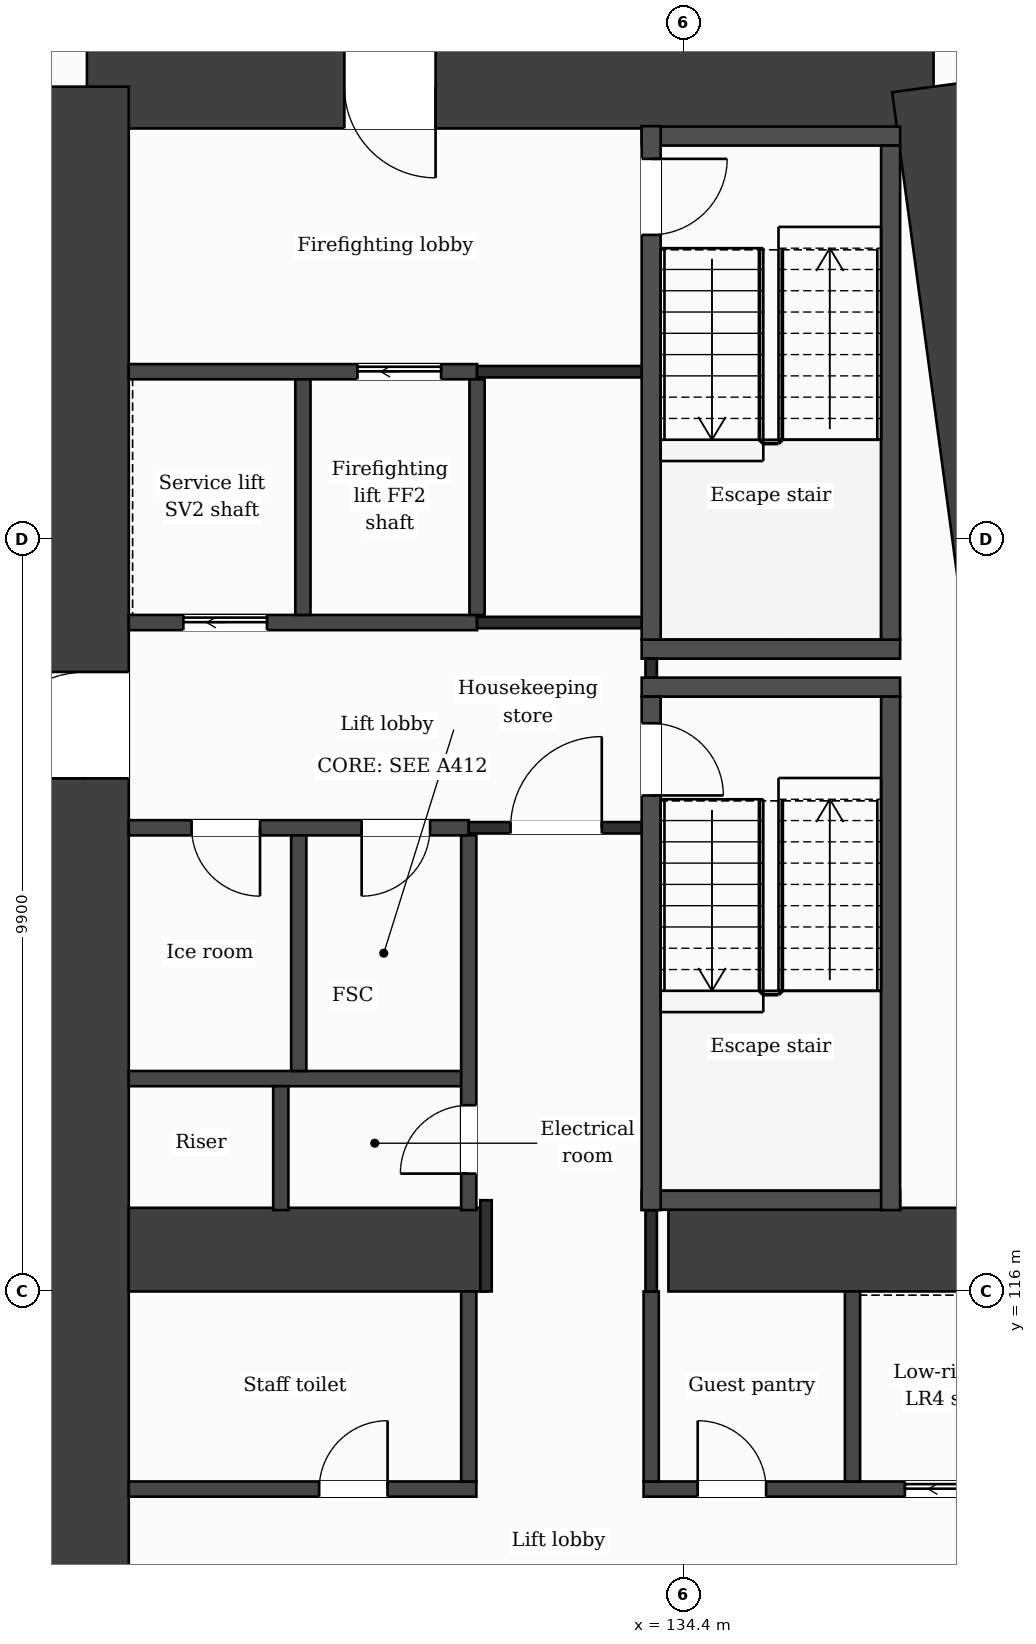
"""IFC4 building model, lengths in metres.
Left out: names, types, materials, properties, quantities, classifications, styles, units other than length and angle.
Written with IfcOpenShell. Run it as: python <this file> out.ifc"""

import sys

from ifc_helpers import new_model, si_unit, direction, frame, frame_2d, origin, place, context, subcontext, project, spatial, rectangle, extrude, element, fill, save


model = new_model("IFC4")
c1 = context("Model", 3, precision=1e-05, world=origin(), true_north=direction((0.0, 1.0)))
c2 = subcontext(c1, "Body", "Model", "MODEL_VIEW")
j1 = project(units=[si_unit("LENGTHUNIT", "METRE"), si_unit("PLANEANGLEUNIT", "RADIAN")], contexts=[c1])
p1 = place(None, origin())
s1 = spatial("IfcSite", under=j1, at=p1, CompositionType="ELEMENT")
p2 = place(p1, origin())
s2 = spatial("IfcBuilding", under=s1, at=p2, CompositionType="ELEMENT")
p3 = place(p2, frame((0.0, 0.0, 56.5)))
s3 = spatial("IfcBuildingStorey", under=s2, at=p3, CompositionType="ELEMENT", Elevation=56.5)
p4 = place(p3, frame((126.55, 131.85, 0.0), z_axis=(0.0, 0.0, 1.0), x_axis=(1.0, 0.0, 0.0)))
e1 = element("IfcWall", 1, at=p4, inside=s3, PredefinedType="SHEAR", context=c2, shape_type="SweptSolid", body=[
    extrude(rectangle(XDim=11.138, YDim=1.1, at=frame_2d((5.569, 0.0))), origin(), (0.0, 0.0, 1.0), 3.5),
])
p5 = place(p4, frame((3.386, 0.0, 0.0)))
e2 = element("IfcOpeningElement", 2, at=p5, cuts=e1, PredefinedType="OPENING", context=c2, shape_type="SweptSolid", body=[
    extrude(rectangle(XDim=1.2, YDim=2.1, at=frame_2d((0.6, 1.05))), frame((0.0, 0.56, 0.0), z_axis=(0.0, -1.0, 0.0), x_axis=(1.0, 0.0, 0.0)), (0.0, 0.0, 1.0), 1.12),
])
p6 = place(p3, frame((137.688, 131.85, 0.0), z_axis=(0.0, 0.0, 1.0), x_axis=(0.133411793472, -0.991060691059, 0.0)))
e3 = element("IfcWall", 3, at=p6, inside=s3, PredefinedType="SHEAR", context=c2, shape_type="SweptSolid", body=[
    extrude(rectangle(XDim=21.089, YDim=1.1, at=frame_2d((10.544, 0.0))), origin(), (0.0, 0.0, 1.0), 3.5),
])
p7 = place(p3, frame((126.55, 110.95, 0.0), z_axis=(0.0, 0.0, 1.0), x_axis=(0.0, 1.0, 0.0)))
e4 = element("IfcWall", 4, at=p7, inside=s3, PredefinedType="SHEAR", context=c2, shape_type="SweptSolid", body=[
    extrude(rectangle(XDim=20.9, YDim=1.1, at=frame_2d((10.45, 0.0))), origin(), (0.0, 0.0, 1.0), 3.5),
])
p8 = place(p7, frame((11.8, 0.0, 0.0)))
e5 = element("IfcOpeningElement", 5, at=p8, cuts=e4, PredefinedType="OPENING", context=c2, shape_type="SweptSolid", body=[
    extrude(rectangle(XDim=1.4, YDim=2.1, at=frame_2d((0.7, 1.05))), frame((0.0, 0.56, 0.0), z_axis=(0.0, -1.0, 0.0), x_axis=(1.0, 0.0, 0.0)), (0.0, 0.0, 1.0), 1.12),
])
p9 = place(p3, frame((127.1, 116.55, 0.0), z_axis=(0.0, 0.0, 1.0), x_axis=(1.0, 0.0, 0.0)))
e6 = element("IfcWall", 6, at=p9, inside=s3, PredefinedType="SHEAR", context=c2, shape_type="SweptSolid", body=[
    extrude(rectangle(XDim=4.7, YDim=1.1, at=frame_2d((2.35, 0.0))), origin(), (0.0, 0.0, 1.0), 3.5),
])
p10 = place(p3, frame((134.2, 116.55, 0.0), z_axis=(0.0, 0.0, 1.0), x_axis=(1.0, 0.0, 0.0)))
e7 = element("IfcWall", 7, at=p10, inside=s3, PredefinedType="SHEAR", context=c2, shape_type="SweptSolid", body=[
    extrude(rectangle(XDim=5.077, YDim=1.1, at=frame_2d((2.539, 0.0))), origin(), (0.0, 0.0, 1.0), 3.5),
])
p11 = place(p3, frame((127.1, 113.4, 0.0), z_axis=(0.0, 0.0, 1.0), x_axis=(1.0, 0.0, 0.0)))
e8 = element("IfcWall", 8, at=p11, inside=s3, PredefinedType="PARTITIONING", context=c2, shape_type="SweptSolid", body=[
    extrude(rectangle(XDim=4.573, YDim=0.2, at=frame_2d((2.287, 0.0))), origin(), (0.0, 0.0, 1.0), 3.18),
])
p12 = place(p11, frame((2.505, 0.0, 0.0)))
e9 = element("IfcOpeningElement", 9, at=p12, cuts=e8, PredefinedType="OPENING", context=c2, shape_type="SweptSolid", body=[
    extrude(rectangle(XDim=0.9, YDim=2.1, at=frame_2d((0.45, 1.05))), frame((0.0, 0.11, 0.0), z_axis=(0.0, -1.0, 0.0), x_axis=(1.0, 0.0, 0.0)), (0.0, 0.0, 1.0), 0.22),
])
p13 = place(p3, frame((133.873, 113.4, 0.0), z_axis=(0.0, 0.0, 1.0), x_axis=(1.0, 0.0, 0.0)))
e10 = element("IfcWall", 10, at=p13, inside=s3, PredefinedType="PARTITIONING", context=c2, shape_type="SweptSolid", body=[
    extrude(rectangle(XDim=5.774, YDim=0.2, at=frame_2d((2.887, 0.0))), origin(), (0.0, 0.0, 1.0), 3.18),
])
p14 = place(p13, frame((3.438, 0.0, 0.0)))
e11 = element("IfcOpeningElement", 11, at=p14, cuts=e10, PredefinedType="OPENING", context=c2, shape_type="SweptSolid", body=[
    extrude(rectangle(XDim=1.1, YDim=2.1, at=frame_2d((0.55, 1.05))), frame((0.0, 0.11, 0.0), z_axis=(0.0, -1.0, 0.0), x_axis=(1.0, 0.0, 0.0)), (0.0, 0.0, 1.0), 0.22),
])
p15 = place(p13, frame((0.712, 0.0, 0.0)))
e12 = element("IfcOpeningElement", 12, at=p15, cuts=e10, PredefinedType="OPENING", context=c2, shape_type="SweptSolid", body=[
    extrude(rectangle(XDim=0.9, YDim=2.1, at=frame_2d((0.45, 1.05))), frame((0.0, 0.11, 0.0), z_axis=(0.0, -1.0, 0.0), x_axis=(1.0, 0.0, 0.0)), (0.0, 0.0, 1.0), 0.22),
])
p16 = place(p3, frame((133.848, 117.2, 0.0), z_axis=(0.0, 0.0, 1.0), x_axis=(1.0, 0.0, 0.0)))
e13 = element("IfcWall", 13, at=p16, inside=s3, PredefinedType="PARTITIONING", context=c2, shape_type="SweptSolid", body=[
    extrude(rectangle(XDim=3.4, YDim=0.25, at=frame_2d((1.7, 0.0))), origin(), (0.0, 0.0, 1.0), 3.18),
])
p17 = place(p3, frame((127.1, 118.8, 0.0), z_axis=(0.0, 0.0, 1.0), x_axis=(1.0, 0.0, 0.0)))
e14 = element("IfcWall", 14, at=p17, inside=s3, PredefinedType="PARTITIONING", context=c2, shape_type="SweptSolid", body=[
    extrude(rectangle(XDim=4.473, YDim=0.2, at=frame_2d((2.236, 0.0))), origin(), (0.0, 0.0, 1.0), 3.18),
])
p18 = place(p3, frame((127.1, 122.1, 0.0), z_axis=(0.0, 0.0, 1.0), x_axis=(1.0, 0.0, 0.0)))
e15 = element("IfcWall", 15, at=p18, inside=s3, PredefinedType="PARTITIONING", context=c2, shape_type="SweptSolid", body=[
    extrude(rectangle(XDim=4.473, YDim=0.2, at=frame_2d((2.236, 0.0))), origin(), (0.0, 0.0, 1.0), 3.18),
])
p19 = place(p18, frame((3.064, 0.0, 0.0)))
e16 = element("IfcOpeningElement", 16, at=p19, cuts=e15, PredefinedType="OPENING", context=c2, shape_type="SweptSolid", body=[
    extrude(rectangle(XDim=0.9, YDim=2.1, at=frame_2d((0.45, 1.05))), frame((0.0, 0.11, 0.0), z_axis=(0.0, -1.0, 0.0), x_axis=(1.0, 0.0, 0.0)), (0.0, 0.0, 1.0), 0.22),
])
p20 = place(p18, frame((0.827, 0.0, 0.0)))
e17 = element("IfcOpeningElement", 17, at=p20, cuts=e15, PredefinedType="OPENING", context=c2, shape_type="SweptSolid", body=[
    extrude(rectangle(XDim=0.9, YDim=2.1, at=frame_2d((0.45, 1.05))), frame((0.0, 0.11, 0.0), z_axis=(0.0, -1.0, 0.0), x_axis=(1.0, 0.0, 0.0)), (0.0, 0.0, 1.0), 0.22),
])
p21 = place(p3, frame((131.573, 122.1, 0.0), z_axis=(0.0, 0.0, 1.0), x_axis=(1.0, 0.0, 0.0)))
e18 = element("IfcWall", 18, at=p21, inside=s3, PredefinedType="PARTITIONING", context=c2, shape_type="SweptSolid", body=[
    extrude(rectangle(XDim=2.4, YDim=0.15, at=frame_2d((1.2, 0.0))), origin(), (0.0, 0.0, 1.0), 3.18),
])
p22 = place(p21, frame((0.55, 0.0, 0.0)))
e19 = element("IfcOpeningElement", 19, at=p22, cuts=e18, PredefinedType="OPENING", context=c2, shape_type="SweptSolid", body=[
    extrude(rectangle(XDim=1.2, YDim=2.1, at=frame_2d((0.6, 1.05))), frame((0.0, 0.085, 0.0), z_axis=(0.0, -1.0, 0.0), x_axis=(1.0, 0.0, 0.0)), (0.0, 0.0, 1.0), 0.17),
])
for number, where, z_axis, x_axis in (
    (20, (133.848, 123.95, 0.0), (0.0, 0.0, 1.0), (1.0, 0.0, 0.0)),
    (21, (133.848, 124.45, 0.0), (0.0, 0.0, 1.0), (1.0, 0.0, 0.0)),
):
    element("IfcWall", number, at=place(p3, frame(where, z_axis=z_axis, x_axis=x_axis)), inside=s3, PredefinedType="PARTITIONING", context=c2, shape_type="SweptSolid", body=[
        extrude(rectangle(XDim=3.4, YDim=0.25, at=frame_2d((1.7, 0.0))), origin(), (0.0, 0.0, 1.0), 3.18),
    ])
p23 = place(p3, frame((127.1, 124.8, 0.0), z_axis=(0.0, 0.0, 1.0), x_axis=(1.0, 0.0, 0.0)))
e22 = element("IfcWall", 22, at=p23, inside=s3, PredefinedType="PARTITIONING", context=c2, shape_type="SweptSolid", body=[
    extrude(rectangle(XDim=4.582, YDim=0.2, at=frame_2d((2.291, 0.0))), origin(), (0.0, 0.0, 1.0), 3.18),
])
p24 = place(p23, frame((0.718, 0.0, 0.0)))
e23 = element("IfcOpeningElement", 23, at=p24, cuts=e22, PredefinedType="OPENING", context=c2, shape_type="SweptSolid", body=[
    extrude(rectangle(XDim=1.1, YDim=2.1, at=frame_2d((0.55, 1.05))), frame((0.0, 0.11, 0.0), z_axis=(0.0, -1.0, 0.0), x_axis=(1.0, 0.0, 0.0)), (0.0, 0.0, 1.0), 0.22),
])
p25 = place(p3, frame((131.682, 124.8, 0.0), z_axis=(0.0, 0.0, 1.0), x_axis=(1.0, 0.0, 0.0)))
e24 = element("IfcWall", 24, at=p25, inside=s3, PredefinedType="PARTITIONING", context=c2, shape_type="SweptSolid", body=[
    extrude(rectangle(XDim=2.416, YDim=0.15, at=frame_2d((1.208, 0.0))), origin(), (0.0, 0.0, 1.0), 3.18),
])
p26 = place(p3, frame((127.1, 128.1, 0.0), z_axis=(0.0, 0.0, 1.0), x_axis=(1.0, 0.0, 0.0)))
e25 = element("IfcWall", 25, at=p26, inside=s3, PredefinedType="PARTITIONING", context=c2, shape_type="SweptSolid", body=[
    extrude(rectangle(XDim=4.582, YDim=0.2, at=frame_2d((2.291, 0.0))), origin(), (0.0, 0.0, 1.0), 3.18),
])
p27 = place(p26, frame((3.009, 0.0, 0.0)))
e26 = element("IfcOpeningElement", 26, at=p27, cuts=e25, PredefinedType="OPENING", context=c2, shape_type="SweptSolid", body=[
    extrude(rectangle(XDim=1.1, YDim=2.1, at=frame_2d((0.55, 1.05))), frame((0.0, 0.11, 0.0), z_axis=(0.0, -1.0, 0.0), x_axis=(1.0, 0.0, 0.0)), (0.0, 0.0, 1.0), 0.22),
])
p28 = place(p3, frame((131.682, 128.1, 0.0), z_axis=(0.0, 0.0, 1.0), x_axis=(1.0, 0.0, 0.0)))
e27 = element("IfcWall", 27, at=p28, inside=s3, PredefinedType="PARTITIONING", context=c2, shape_type="SweptSolid", body=[
    extrude(rectangle(XDim=2.291, YDim=0.15, at=frame_2d((1.146, 0.0))), origin(), (0.0, 0.0, 1.0), 3.18),
])
p29 = place(p3, frame((133.848, 131.2, 0.0), z_axis=(0.0, 0.0, 1.0), x_axis=(1.0, 0.0, 0.0)))
e28 = element("IfcWall", 28, at=p29, inside=s3, PredefinedType="PARTITIONING", context=c2, shape_type="SweptSolid", body=[
    extrude(rectangle(XDim=3.4, YDim=0.25, at=frame_2d((1.7, 0.0))), origin(), (0.0, 0.0, 1.0), 3.18),
])
p30 = place(p3, frame((129.1, 117.07, 0.0), z_axis=(0.0, 0.0, 1.0), x_axis=(0.0, 1.0, 0.0)))
e29 = element("IfcWall", 29, at=p30, inside=s3, PredefinedType="PARTITIONING", context=c2, shape_type="SweptSolid", body=[
    extrude(rectangle(XDim=1.63, YDim=0.2, at=frame_2d((0.815, 0.0))), origin(), (0.0, 0.0, 1.0), 3.18),
])
for number, where, z_axis, x_axis in (
    (30, (129.336, 118.9, 0.0), (0.0, 0.0, 1.0), (0.0, 1.0, 0.0)),
    (31, (129.391, 124.9, 0.0), (0.0, 0.0, 1.0), (0.0, 1.0, 0.0)),
):
    element("IfcWall", number, at=place(p3, frame(where, z_axis=z_axis, x_axis=x_axis)), inside=s3, PredefinedType="PARTITIONING", context=c2, shape_type="SweptSolid", body=[
        extrude(rectangle(XDim=3.1, YDim=0.2, at=frame_2d((1.55, 0.0))), origin(), (0.0, 0.0, 1.0), 3.18),
    ])
p31 = place(p3, frame((131.573, 113.5, 0.0), z_axis=(0.0, 0.0, 1.0), x_axis=(0.0, 1.0, 0.0)))
e32 = element("IfcWall", 32, at=p31, inside=s3, PredefinedType="PARTITIONING", context=c2, shape_type="SweptSolid", body=[
    extrude(rectangle(XDim=2.5, YDim=0.2, at=frame_2d((1.25, 0.0))), origin(), (0.0, 0.0, 1.0), 3.18),
])
p32 = place(p3, frame((131.573, 117.07, 0.0), z_axis=(0.0, 0.0, 1.0), x_axis=(0.0, 1.0, 0.0)))
e33 = element("IfcWall", 33, at=p32, inside=s3, PredefinedType="PARTITIONING", context=c2, shape_type="SweptSolid", body=[
    extrude(rectangle(XDim=4.93, YDim=0.2, at=frame_2d((2.465, 0.0))), origin(), (0.0, 0.0, 1.0), 3.18),
])
p33 = place(p32, frame((0.48, 0.0, 0.0)))
e34 = element("IfcOpeningElement", 34, at=p33, cuts=e33, PredefinedType="OPENING", context=c2, shape_type="SweptSolid", body=[
    extrude(rectangle(XDim=0.9, YDim=2.1, at=frame_2d((0.45, 1.05))), frame((0.0, 0.11, 0.0), z_axis=(0.0, -1.0, 0.0), x_axis=(1.0, 0.0, 0.0)), (0.0, 0.0, 1.0), 0.22),
])
p34 = place(p3, frame((131.682, 124.9, 0.0), z_axis=(0.0, 0.0, 1.0), x_axis=(0.0, 1.0, 0.0)))
e35 = element("IfcWall", 35, at=p34, inside=s3, PredefinedType="PARTITIONING", context=c2, shape_type="SweptSolid", body=[
    extrude(rectangle(XDim=3.1, YDim=0.2, at=frame_2d((1.55, 0.0))), origin(), (0.0, 0.0, 1.0), 3.18),
])
p35 = place(p3, frame((131.8, 116.0, 0.0), z_axis=(0.0, 0.0, 1.0), x_axis=(0.0, 1.0, 0.0)))
e36 = element("IfcWall", 36, at=p35, inside=s3, PredefinedType="PARTITIONING", context=c2, shape_type="SweptSolid", body=[
    extrude(rectangle(XDim=1.2, YDim=0.15, at=frame_2d((0.6, 0.0))), origin(), (0.0, 0.0, 1.0), 3.18),
])
p36 = place(p3, frame((133.973, 113.5, 0.0), z_axis=(0.0, 0.0, 1.0), x_axis=(0.0, 1.0, 0.0)))
e37 = element("IfcWall", 37, at=p36, inside=s3, PredefinedType="PARTITIONING", context=c2, shape_type="SweptSolid", body=[
    extrude(rectangle(XDim=2.5, YDim=0.2, at=frame_2d((1.25, 0.0))), origin(), (0.0, 0.0, 1.0), 3.18),
])
p37 = place(p3, frame((133.973, 116.0, 0.0), z_axis=(0.0, 0.0, 1.0), x_axis=(0.0, 1.0, 0.0)))
e38 = element("IfcWall", 38, at=p37, inside=s3, PredefinedType="PARTITIONING", context=c2, shape_type="SweptSolid", body=[
    extrude(rectangle(XDim=1.07, YDim=0.15, at=frame_2d((0.535, 0.0))), origin(), (0.0, 0.0, 1.0), 3.18),
])
p38 = place(p3, frame((133.973, 124.075, 0.0), z_axis=(0.0, 0.0, 1.0), x_axis=(0.0, 1.0, 0.0)))
e39 = element("IfcWall", 39, at=p38, inside=s3, PredefinedType="PARTITIONING", context=c2, shape_type="SweptSolid", body=[
    extrude(rectangle(XDim=0.25, YDim=0.15, at=frame_2d((0.125, 0.0))), origin(), (0.0, 0.0, 1.0), 3.18),
])
p39 = place(p3, frame((133.973, 117.07, 0.0), z_axis=(0.0, 0.0, 1.0), x_axis=(0.0, 1.0, 0.0)))
e40 = element("IfcWall", 40, at=p39, inside=s3, PredefinedType="PARTITIONING", context=c2, shape_type="SweptSolid", body=[
    extrude(rectangle(XDim=6.755, YDim=0.25, at=frame_2d((3.377, 0.0))), origin(), (0.0, 0.0, 1.0), 3.18),
])
p40 = place(p39, frame((5.455, 0.0, 0.0)))
e41 = element("IfcOpeningElement", 41, at=p40, cuts=e40, PredefinedType="OPENING", context=c2, shape_type="SweptSolid", body=[
    extrude(rectangle(XDim=0.95, YDim=2.1, at=frame_2d((0.475, 1.05))), frame((0.0, 0.135, 0.0), z_axis=(0.0, -1.0, 0.0), x_axis=(1.0, 0.0, 0.0)), (0.0, 0.0, 1.0), 0.27),
])
p41 = place(p3, frame((133.973, 124.575, 0.0), z_axis=(0.0, 0.0, 1.0), x_axis=(0.0, 1.0, 0.0)))
e42 = element("IfcWall", 42, at=p41, inside=s3, PredefinedType="PARTITIONING", context=c2, shape_type="SweptSolid", body=[
    extrude(rectangle(XDim=6.755, YDim=0.25, at=frame_2d((3.377, 0.0))), origin(), (0.0, 0.0, 1.0), 3.18),
])
p42 = place(p41, frame((5.325, 0.0, 0.0)))
e43 = element("IfcOpeningElement", 43, at=p42, cuts=e42, PredefinedType="OPENING", context=c2, shape_type="SweptSolid", body=[
    extrude(rectangle(XDim=1.0, YDim=2.1, at=frame_2d((0.5, 1.05))), frame((0.0, 0.135, 0.0), z_axis=(0.0, -1.0, 0.0), x_axis=(1.0, 0.0, 0.0)), (0.0, 0.0, 1.0), 0.27),
])
p43 = place(p3, frame((136.622, 113.5, 0.0), z_axis=(0.0, 0.0, 1.0), x_axis=(0.0, 1.0, 0.0)))
e44 = element("IfcWall", 44, at=p43, inside=s3, PredefinedType="PARTITIONING", context=c2, shape_type="SweptSolid", body=[
    extrude(rectangle(XDim=2.5, YDim=0.2, at=frame_2d((1.25, 0.0))), origin(), (0.0, 0.0, 1.0), 3.18),
])
p44 = place(p3, frame((137.123, 117.07, 0.0), z_axis=(0.0, 0.0, 1.0), x_axis=(0.0, 1.0, 0.0)))
e45 = element("IfcWall", 45, at=p44, inside=s3, PredefinedType="PARTITIONING", context=c2, shape_type="SweptSolid", body=[
    extrude(rectangle(XDim=6.755, YDim=0.25, at=frame_2d((3.377, 0.0))), origin(), (0.0, 0.0, 1.0), 3.18),
])
p45 = place(p3, frame((137.123, 124.575, 0.0), z_axis=(0.0, 0.0, 1.0), x_axis=(0.0, 1.0, 0.0)))
e46 = element("IfcWall", 46, at=p45, inside=s3, PredefinedType="PARTITIONING", context=c2, shape_type="SweptSolid", body=[
    extrude(rectangle(XDim=6.5, YDim=0.25, at=frame_2d((3.25, 0.0))), origin(), (0.0, 0.0, 1.0), 3.18),
])
p46 = place(p22, origin())
e47 = element("IfcDoor", 47, at=p46, inside=s3, OperationType="SINGLE_SWING_RIGHT", PredefinedType="DOOR", context=c2, shape_type="SweptSolid", body=[
    extrude(rectangle(XDim=1.2, YDim=2.1, at=frame_2d((0.6, 1.05))), frame((0.0, 0.025, 0.0), z_axis=(0.0, -1.0, 0.0), x_axis=(1.0, 0.0, 0.0)), (0.0, 0.0, 1.0), 0.05),
])
fill(e19, e47)
p47 = place(p27, origin())
e48 = element("IfcDoor", 48, at=p47, inside=s3, OperationType="SLIDING_TO_LEFT", PredefinedType="DOOR", context=c2, shape_type="SweptSolid", body=[
    extrude(rectangle(XDim=1.1, YDim=2.1, at=frame_2d((0.55, 1.05))), frame((0.0, 0.025, 0.0), z_axis=(0.0, -1.0, 0.0), x_axis=(1.0, 0.0, 0.0)), (0.0, 0.0, 1.0), 0.05),
])
fill(e26, e48)
p48 = place(p24, origin())
e49 = element("IfcDoor", 49, at=p48, inside=s3, OperationType="SLIDING_TO_LEFT", PredefinedType="DOOR", context=c2, shape_type="SweptSolid", body=[
    extrude(rectangle(XDim=1.1, YDim=2.1, at=frame_2d((0.55, 1.05))), frame((0.0, 0.025, 0.0), z_axis=(0.0, -1.0, 0.0), x_axis=(1.0, 0.0, 0.0)), (0.0, 0.0, 1.0), 0.05),
])
fill(e23, e49)
p49 = place(p19, origin())
e50 = element("IfcDoor", 50, at=p49, inside=s3, OperationType="SINGLE_SWING_LEFT", PredefinedType="DOOR", context=c2, shape_type="SweptSolid", body=[
    extrude(rectangle(XDim=0.9, YDim=2.1, at=frame_2d((0.45, 1.05))), frame((0.0, 0.025, 0.0), z_axis=(0.0, -1.0, 0.0), x_axis=(1.0, 0.0, 0.0)), (0.0, 0.0, 1.0), 0.05),
])
fill(e16, e50)
p50 = place(p20, origin())
e51 = element("IfcDoor", 51, at=p50, inside=s3, OperationType="SINGLE_SWING_RIGHT", PredefinedType="DOOR", context=c2, shape_type="SweptSolid", body=[
    extrude(rectangle(XDim=0.9, YDim=2.1, at=frame_2d((0.45, 1.05))), frame((0.0, 0.025, 0.0), z_axis=(0.0, -1.0, 0.0), x_axis=(1.0, 0.0, 0.0)), (0.0, 0.0, 1.0), 0.05),
])
fill(e17, e51)
p51 = place(p40, origin())
e52 = element("IfcDoor", 52, at=p51, inside=s3, OperationType="SINGLE_SWING_LEFT", PredefinedType="DOOR", context=c2, shape_type="SweptSolid", body=[
    extrude(rectangle(XDim=0.95, YDim=2.1, at=frame_2d((0.475, 1.05))), frame((0.0, 0.025, 0.0), z_axis=(0.0, -1.0, 0.0), x_axis=(1.0, 0.0, 0.0)), (0.0, 0.0, 1.0), 0.05),
])
fill(e41, e52)
p52 = place(p42, origin())
e53 = element("IfcDoor", 53, at=p52, inside=s3, OperationType="SINGLE_SWING_RIGHT", PredefinedType="DOOR", context=c2, shape_type="SweptSolid", body=[
    extrude(rectangle(XDim=1.0, YDim=2.1, at=frame_2d((0.5, 1.05))), frame((0.0, 0.025, 0.0), z_axis=(0.0, -1.0, 0.0), x_axis=(1.0, 0.0, 0.0)), (0.0, 0.0, 1.0), 0.05),
])
fill(e43, e53)
p53 = place(p33, origin())
e54 = element("IfcDoor", 54, at=p53, inside=s3, OperationType="SINGLE_SWING_LEFT", PredefinedType="DOOR", context=c2, shape_type="SweptSolid", body=[
    extrude(rectangle(XDim=0.9, YDim=2.1, at=frame_2d((0.45, 1.05))), frame((0.0, 0.025, 0.0), z_axis=(0.0, -1.0, 0.0), x_axis=(1.0, 0.0, 0.0)), (0.0, 0.0, 1.0), 0.05),
])
fill(e34, e54)
p54 = place(p14, origin())
e55 = element("IfcDoor", 55, at=p54, inside=s3, OperationType="SLIDING_TO_LEFT", PredefinedType="DOOR", context=c2, shape_type="SweptSolid", body=[
    extrude(rectangle(XDim=1.1, YDim=2.1, at=frame_2d((0.55, 1.05))), frame((0.0, 0.025, 0.0), z_axis=(0.0, -1.0, 0.0), x_axis=(1.0, 0.0, 0.0)), (0.0, 0.0, 1.0), 0.05),
])
fill(e11, e55)
p55 = place(p15, origin())
e56 = element("IfcDoor", 56, at=p55, inside=s3, OperationType="SINGLE_SWING_LEFT", PredefinedType="DOOR", context=c2, shape_type="SweptSolid", body=[
    extrude(rectangle(XDim=0.9, YDim=2.1, at=frame_2d((0.45, 1.05))), frame((0.0, 0.025, 0.0), z_axis=(0.0, -1.0, 0.0), x_axis=(1.0, 0.0, 0.0)), (0.0, 0.0, 1.0), 0.05),
])
fill(e12, e56)
p56 = place(p12, origin())
e57 = element("IfcDoor", 57, at=p56, inside=s3, OperationType="SINGLE_SWING_RIGHT", PredefinedType="DOOR", context=c2, shape_type="SweptSolid", body=[
    extrude(rectangle(XDim=0.9, YDim=2.1, at=frame_2d((0.45, 1.05))), frame((0.0, 0.025, 0.0), z_axis=(0.0, -1.0, 0.0), x_axis=(1.0, 0.0, 0.0)), (0.0, 0.0, 1.0), 0.05),
])
fill(e9, e57)
p57 = place(p5, origin())
e58 = element("IfcDoor", 58, at=p57, inside=s3, OperationType="SINGLE_SWING_RIGHT", PredefinedType="DOOR", context=c2, shape_type="SweptSolid", body=[
    extrude(rectangle(XDim=1.2, YDim=2.1, at=frame_2d((0.6, 1.05))), frame((0.0, 0.025, 0.0), z_axis=(0.0, -1.0, 0.0), x_axis=(1.0, 0.0, 0.0)), (0.0, 0.0, 1.0), 0.05),
])
fill(e2, e58)
p58 = place(p8, origin())
e59 = element("IfcDoor", 59, at=p58, inside=s3, OperationType="SINGLE_SWING_LEFT", PredefinedType="DOOR", context=c2, shape_type="SweptSolid", body=[
    extrude(rectangle(XDim=1.4, YDim=2.1, at=frame_2d((0.7, 1.05))), frame((0.0, 0.025, 0.0), z_axis=(0.0, -1.0, 0.0), x_axis=(1.0, 0.0, 0.0)), (0.0, 0.0, 1.0), 0.05),
])
fill(e5, e59)
save(model, sys.argv[1])
